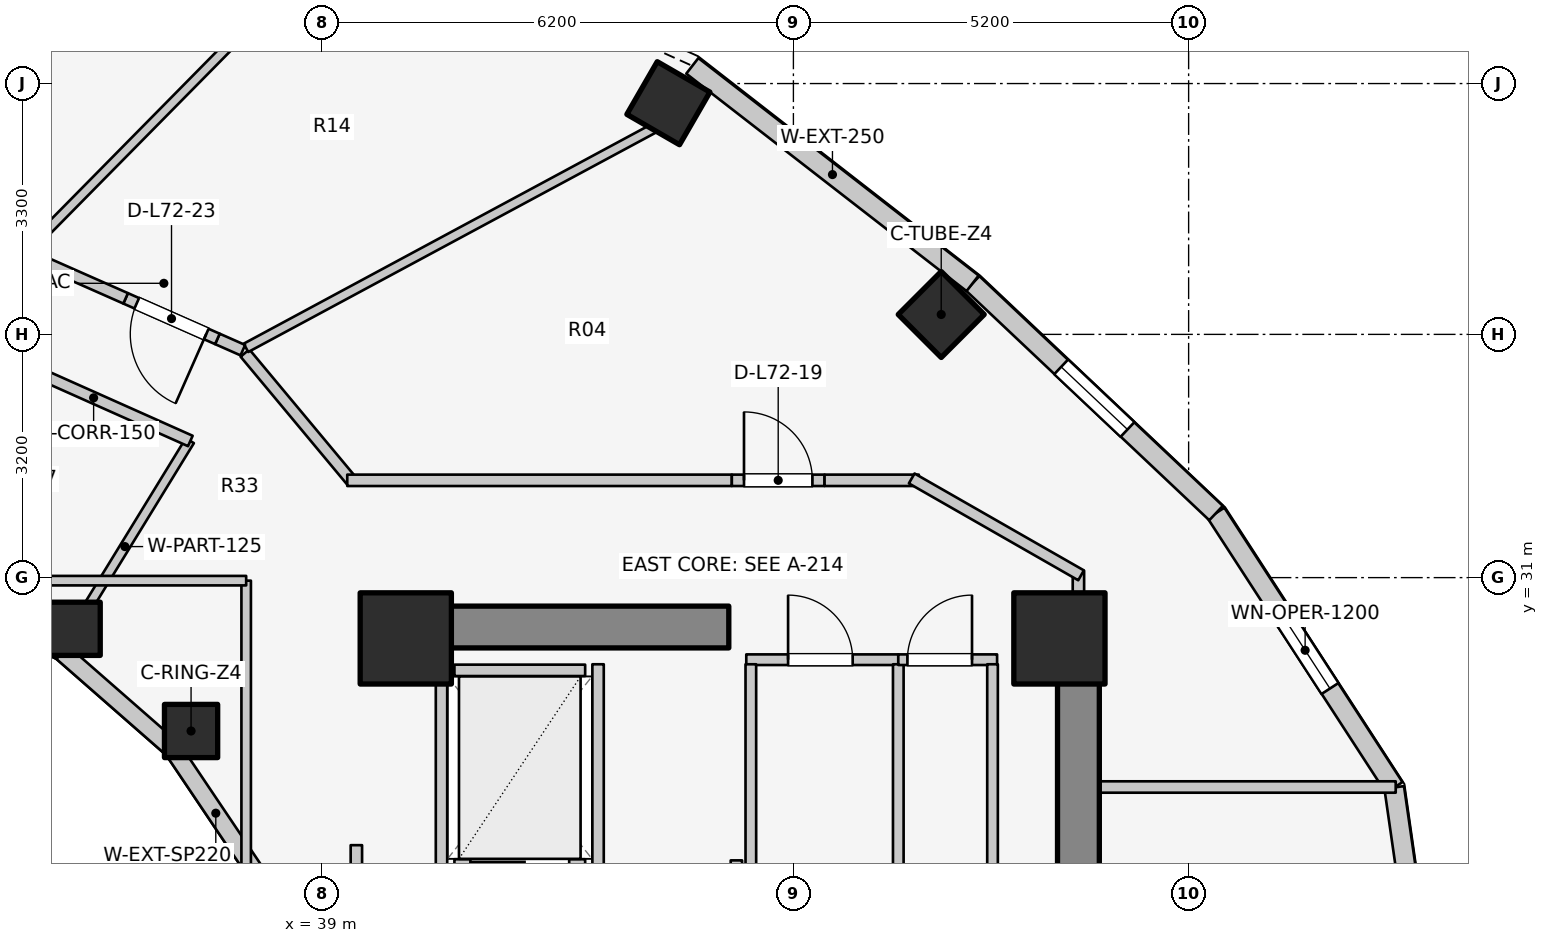
"""IFC4 building model, lengths in metres.
Left out: names, types, materials, properties, quantities, classifications, styles, units other than length and angle.
Written with IfcOpenShell. Run it as: python <this file> out.ifc"""

import sys

from ifc_helpers import new_model, si_unit, direction, frame, frame_2d, origin, origin_2d, place, context, subcontext, project, spatial, rectangle, extrude, element, fill, save


model = new_model("IFC4")
c1 = context("Model", 3, precision=1e-05, world=origin(), true_north=direction((0.0, 1.0)))
c2 = subcontext(c1, "Body", "Model", "MODEL_VIEW")
j1 = project(units=[si_unit("LENGTHUNIT", "METRE"), si_unit("PLANEANGLEUNIT", "RADIAN")], contexts=[c1])
p1 = place(None, origin())
s1 = spatial("IfcSite", under=j1, at=p1, CompositionType="ELEMENT")
p2 = place(p1, origin())
s2 = spatial("IfcBuilding", under=s1, at=p2, CompositionType="ELEMENT")
p3 = place(p2, frame((0.0, 0.0, 235.7)))
s3 = spatial("IfcBuildingStorey", under=s2, at=p3, CompositionType="ELEMENT", Elevation=235.7)
p4 = place(p3, frame((48.95, 17.05, 0.0), z_axis=(0.0, 0.0, 1.0), x_axis=(0.0, 1.0, 0.0)))
e1 = element("IfcWall", 1, at=p4, inside=s3, PredefinedType="SHEAR", context=c2, shape_type="SweptSolid", body=[
    extrude(rectangle(XDim=12.8, YDim=0.55, at=frame_2d((6.4, 0.0))), origin(), (0.0, 0.0, 1.0), 3.1),
])
p5 = place(p3, frame((39.85, 30.35, 0.0), z_axis=(0.0, 0.0, 1.0), x_axis=(1.0, 0.0, 0.0)))
e2 = element("IfcWall", 2, at=p5, inside=s3, PredefinedType="SHEAR", context=c2, shape_type="SweptSolid", body=[
    extrude(rectangle(XDim=4.5, YDim=0.55, at=frame_2d((2.25, 0.0))), origin(), (0.0, 0.0, 1.0), 3.1),
])
for number, where, z_axis, x_axis in (
    (3, (48.7, 30.2, 0.0), (0.0, 0.0, 1.0), (1.0, 0.0, 0.0)),
    (4, (40.1, 30.2, 0.0), (0.0, 0.0, 1.0), (1.0, 0.0, 0.0)),
):
    element("IfcColumn", number, at=place(p3, frame(where, z_axis=z_axis, x_axis=x_axis)), inside=s3, PredefinedType="COLUMN", context=c2, shape_type="SweptSolid", body=[
        extrude(rectangle(XDim=1.2, YDim=1.2, at=origin_2d()), origin(), (0.0, 0.0, 1.0), 3.1),
    ])
p6 = place(p3, frame((37.275, 28.982, 0.0), z_axis=(0.0, 0.0, 1.0), x_axis=(1.0, 0.0, 0.0)))
e5 = element("IfcColumn", 5, at=p6, inside=s3, PredefinedType="COLUMN", context=c2, shape_type="SweptSolid", body=[
    extrude(rectangle(XDim=0.7, YDim=0.7, at=origin_2d()), origin(), (0.0, 0.0, 1.0), 3.1),
])
p7 = place(p3, frame((47.145, 34.462, 0.0), z_axis=(0.0, 0.0, 1.0), x_axis=(0.707106781187, 0.707106781187, 0.0)))
e6 = element("IfcColumn", 6, at=p7, inside=s3, PredefinedType="COLUMN", context=c2, shape_type="SweptSolid", body=[
    extrude(rectangle(XDim=0.8, YDim=0.8, at=origin_2d()), origin(), (0.0, 0.0, 1.0), 3.1),
])
p8 = place(p3, frame((35.73, 30.327, 0.0), z_axis=(0.0, 0.0, 1.0), x_axis=(1.0, 0.0, 0.0)))
e7 = element("IfcColumn", 7, at=p8, inside=s3, PredefinedType="COLUMN", context=c2, shape_type="SweptSolid", body=[
    extrude(rectangle(XDim=0.7, YDim=0.7, at=origin_2d()), origin(), (0.0, 0.0, 1.0), 3.1),
])
p9 = place(p3, frame((43.555, 37.241, 0.0), z_axis=(0.0, 0.0, 1.0), x_axis=(0.5, 0.866025403784, 0.0)))
e8 = element("IfcColumn", 8, at=p9, inside=s3, PredefinedType="COLUMN", context=c2, shape_type="SweptSolid", body=[
    extrude(rectangle(XDim=0.8, YDim=0.8, at=origin_2d()), origin(), (0.0, 0.0, 1.0), 3.1),
])
p10 = place(p3, frame((38.166, 27.06, 0.0), z_axis=(0.0, 0.0, 1.0), x_axis=(-0.558197800898, 0.829707909492, 0.0)))
e9 = element("IfcWall", 9, at=p10, inside=s3, PredefinedType="STANDARD", context=c2, shape_type="SweptSolid", body=[
    extrude(rectangle(XDim=2.027, YDim=0.23, at=frame_2d((1.013, 0.0))), origin(), (0.0, 0.0, 1.0), 1.22),
])
p11 = place(p3, frame((37.035, 28.742, 0.0), z_axis=(0.0, 0.0, 1.0), x_axis=(-0.752576694707, 0.658504607869, 0.0)))
e10 = element("IfcWall", 10, at=p11, inside=s3, PredefinedType="STANDARD", context=c2, shape_type="SweptSolid", body=[
    extrude(rectangle(XDim=1.959, YDim=0.23, at=frame_2d((0.98, 0.0))), origin(), (0.0, 0.0, 1.0), 1.22),
])
p12 = place(p3, frame((35.56, 30.032, 0.0), z_axis=(0.0, 0.0, 1.0), x_axis=(-0.904179699603, 0.427152280606, 0.0)))
e11 = element("IfcWall", 11, at=p12, inside=s3, PredefinedType="STANDARD", context=c2, shape_type="SweptSolid", body=[
    extrude(rectangle(XDim=1.899, YDim=0.23, at=frame_2d((0.95, 0.0))), origin(), (0.0, 0.0, 1.0), 1.22),
])
p13 = place(p3, frame((53.86, 23.0, 0.0), z_axis=(0.0, 0.0, 1.0), x_axis=(-0.142712754019, 0.989764148593, 0.0)))
e12 = element("IfcWall", 12, at=p13, inside=s3, PredefinedType="STANDARD", context=c2, shape_type="SweptSolid", body=[
    extrude(rectangle(XDim=5.293, YDim=0.26, at=frame_2d((2.646, 0.0))), origin(), (0.0, 0.0, 1.0), 2.57),
])
p14 = place(p13, frame((1.896, 0.0, 0.75)))
e13 = element("IfcOpeningElement", 13, at=p14, cuts=e12, PredefinedType="OPENING", context=c2, shape_type="SweptSolid", body=[
    extrude(rectangle(XDim=1.5, YDim=1.6, at=frame_2d((0.75, 0.8))), frame((0.0, 0.14, 0.0), z_axis=(0.0, -1.0, 0.0), x_axis=(1.0, 0.0, 0.0)), (0.0, 0.0, 1.0), 0.28),
])
p15 = place(p3, frame((53.105, 28.239, 0.0), z_axis=(0.0, 0.0, 1.0), x_axis=(-0.544475908819, 0.838776480784, 0.0)))
e14 = element("IfcWall", 14, at=p15, inside=s3, PredefinedType="STANDARD", context=c2, shape_type="SweptSolid", body=[
    extrude(rectangle(XDim=4.305, YDim=0.26, at=frame_2d((2.152, 0.0))), origin(), (0.0, 0.0, 1.0), 1.22),
])
p16 = place(p15, frame((1.552, 0.0, 0.15)))
e15 = element("IfcOpeningElement", 15, at=p16, cuts=e14, PredefinedType="OPENING", context=c2, shape_type="SweptSolid", body=[
    extrude(rectangle(XDim=1.2, YDim=0.9, at=frame_2d((0.6, 0.45))), frame((0.0, 0.14, 0.0), z_axis=(0.0, -1.0, 0.0), x_axis=(1.0, 0.0, 0.0)), (0.0, 0.0, 1.0), 0.28),
])
p17 = place(p3, frame((50.761, 31.849, 0.0), z_axis=(0.0, 0.0, 1.0), x_axis=(-0.72731899451, 0.686299555752, 0.0)))
e16 = element("IfcWall", 16, at=p17, inside=s3, PredefinedType="STANDARD", context=c2, shape_type="SweptSolid", body=[
    extrude(rectangle(XDim=4.404, YDim=0.26, at=frame_2d((2.202, 0.0))), origin(), (0.0, 0.0, 1.0), 1.22),
])
p18 = place(p17, frame((1.602, 0.0, 0.15)))
e17 = element("IfcOpeningElement", 17, at=p18, cuts=e16, PredefinedType="OPENING", context=c2, shape_type="SweptSolid", body=[
    extrude(rectangle(XDim=1.2, YDim=0.9, at=frame_2d((0.6, 0.45))), frame((0.0, 0.14, 0.0), z_axis=(0.0, -1.0, 0.0), x_axis=(1.0, 0.0, 0.0)), (0.0, 0.0, 1.0), 0.28),
])
p19 = place(p3, frame((47.558, 34.872, 0.0), z_axis=(0.0, 0.0, 1.0), x_axis=(-0.790126214723, 0.612944177563, 0.0)))
e18 = element("IfcWall", 18, at=p19, inside=s3, PredefinedType="STANDARD", context=c2, shape_type="SweptSolid", body=[
    extrude(rectangle(XDim=4.667, YDim=0.26, at=frame_2d((2.333, 0.0))), origin(), (0.0, 0.0, 1.0), 1.22),
])
p20 = place(p3, frame((40.74, 27.22, 0.0), z_axis=(0.0, 0.0, 1.0), x_axis=(1.0, 0.0, 0.0)))
e19 = element("IfcWall", 19, at=p20, inside=s3, PredefinedType="SOLIDWALL", context=c2, shape_type="SweptSolid", body=[
    extrude(rectangle(XDim=1.72, YDim=0.15, at=frame_2d((0.86, 0.0))), origin(), (0.0, 0.0, 1.0), 2.575),
])
p21 = place(p20, frame((0.21, 0.0, 0.0)))
e20 = element("IfcOpeningElement", 20, at=p21, cuts=e19, PredefinedType="OPENING", context=c2, shape_type="SweptSolid", body=[
    extrude(rectangle(XDim=1.3, YDim=2.1, at=frame_2d((0.65, 1.05))), frame((0.0, 0.085, 0.0), z_axis=(0.0, -1.0, 0.0), x_axis=(1.0, 0.0, 0.0)), (0.0, 0.0, 1.0), 0.17),
])
p22 = place(p3, frame((40.74, 29.78, 0.0), z_axis=(0.0, 0.0, 1.0), x_axis=(1.0, 0.0, 0.0)))
e21 = element("IfcWall", 21, at=p22, inside=s3, PredefinedType="SOLIDWALL", context=c2, shape_type="SweptSolid", body=[
    extrude(rectangle(XDim=1.72, YDim=0.15, at=frame_2d((0.86, 0.0))), origin(), (0.0, 0.0, 1.0), 2.575),
])
for number, where, z_axis, x_axis in (
    (22, (40.57, 27.14, 0.0), (0.0, 0.0, 1.0), (0.0, 1.0, 0.0)),
    (23, (42.63, 27.14, 0.0), (0.0, 0.0, 1.0), (0.0, 1.0, 0.0)),
):
    element("IfcWall", number, at=place(p3, frame(where, z_axis=z_axis, x_axis=x_axis)), inside=s3, PredefinedType="SOLIDWALL", context=c2, shape_type="SweptSolid", body=[
        extrude(rectangle(XDim=2.72, YDim=0.15, at=frame_2d((1.36, 0.0))), origin(), (0.0, 0.0, 1.0), 2.575),
    ])
p23 = place(p3, frame((44.45, 24.08, 0.0), z_axis=(0.0, 0.0, 1.0), x_axis=(0.0, 1.0, 0.0)))
e24 = element("IfcWall", 24, at=p23, inside=s3, PredefinedType="PARTITIONING", context=c2, shape_type="SweptSolid", body=[
    extrude(rectangle(XDim=3.2, YDim=0.15, at=frame_2d((1.6, 0.0))), origin(), (0.0, 0.0, 1.0), 2.575),
])
p24 = place(p3, frame((39.45, 24.08, 0.0), z_axis=(0.0, 0.0, 1.0), x_axis=(0.0, 1.0, 0.0)))
e25 = element("IfcWall", 25, at=p24, inside=s3, PredefinedType="PARTITIONING", context=c2, shape_type="SweptSolid", body=[
    extrude(rectangle(XDim=3.4, YDim=0.15, at=frame_2d((1.7, 0.0))), origin(), (0.0, 0.0, 1.0), 2.575),
])
p25 = place(p24, frame((1.894, 0.0, 0.0)))
e26 = element("IfcOpeningElement", 26, at=p25, cuts=e25, PredefinedType="OPENING", context=c2, shape_type="SweptSolid", body=[
    extrude(rectangle(XDim=1.1, YDim=2.1, at=frame_2d((0.55, 1.05))), frame((0.0, 0.085, 0.0), z_axis=(0.0, -1.0, 0.0), x_axis=(1.0, 0.0, 0.0)), (0.0, 0.0, 1.0), 0.17),
])
p26 = place(p3, frame((44.58, 29.92, 0.0), z_axis=(0.0, 0.0, 1.0), x_axis=(1.0, 0.0, 0.0)))
e27 = element("IfcWall", 27, at=p26, inside=s3, PredefinedType="PLUMBINGWALL", context=c2, shape_type="SweptSolid", body=[
    extrude(rectangle(XDim=2.0, YDim=0.14, at=frame_2d((1.0, 0.0))), origin(), (0.0, 0.0, 1.0), 2.575),
])
p27 = place(p26, frame((0.55, 0.0, 0.0)))
e28 = element("IfcOpeningElement", 28, at=p27, cuts=e27, PredefinedType="OPENING", context=c2, shape_type="SweptSolid", body=[
    extrude(rectangle(XDim=0.85, YDim=2.05, at=frame_2d((0.425, 1.025))), frame((0.0, 0.08, 0.0), z_axis=(0.0, -1.0, 0.0), x_axis=(1.0, 0.0, 0.0)), (0.0, 0.0, 1.0), 0.16),
])
for number, where, z_axis, x_axis in (
    (29, (44.64, 25.98, 0.0), (0.0, 0.0, 1.0), (0.0, 1.0, 0.0)),
    (30, (46.58, 25.98, 0.0), (0.0, 0.0, 1.0), (0.0, 1.0, 0.0)),
):
    element("IfcWall", number, at=place(p3, frame(where, z_axis=z_axis, x_axis=x_axis)), inside=s3, PredefinedType="PLUMBINGWALL", context=c2, shape_type="SweptSolid", body=[
        extrude(rectangle(XDim=3.88, YDim=0.14, at=frame_2d((1.94, 0.0))), origin(), (0.0, 0.0, 1.0), 2.575),
    ])
p28 = place(p3, frame((46.58, 29.92, 0.0), z_axis=(0.0, 0.0, 1.0), x_axis=(1.0, 0.0, 0.0)))
e31 = element("IfcWall", 31, at=p28, inside=s3, PredefinedType="PLUMBINGWALL", context=c2, shape_type="SweptSolid", body=[
    extrude(rectangle(XDim=1.3, YDim=0.14, at=frame_2d((0.65, 0.0))), origin(), (0.0, 0.0, 1.0), 2.575),
])
p29 = place(p28, frame((0.12, 0.0, 0.0)))
e32 = element("IfcOpeningElement", 32, at=p29, cuts=e31, PredefinedType="OPENING", context=c2, shape_type="SweptSolid", body=[
    extrude(rectangle(XDim=0.85, YDim=2.05, at=frame_2d((0.425, 1.025))), frame((0.0, 0.08, 0.0), z_axis=(0.0, -1.0, 0.0), x_axis=(1.0, 0.0, 0.0)), (0.0, 0.0, 1.0), 0.16),
])
p30 = place(p3, frame((47.82, 25.98, 0.0), z_axis=(0.0, 0.0, 1.0), x_axis=(0.0, 1.0, 0.0)))
e33 = element("IfcWall", 33, at=p30, inside=s3, PredefinedType="PLUMBINGWALL", context=c2, shape_type="SweptSolid", body=[
    extrude(rectangle(XDim=3.88, YDim=0.14, at=frame_2d((1.94, 0.0))), origin(), (0.0, 0.0, 1.0), 2.575),
])
p31 = place(p3, frame((35.55, 30.015, 0.0), z_axis=(0.0, 0.0, 1.0), x_axis=(0.522763432117, 0.852477796802, 0.0)))
e34 = element("IfcWall", 34, at=p31, inside=s3, PredefinedType="PARTITIONING", context=c2, shape_type="SweptSolid", body=[
    extrude(rectangle(XDim=3.269, YDim=0.125, at=frame_2d((1.635, 0.0))), origin(), (0.0, 0.0, 1.0), 1.22),
])
p32 = place(p3, frame((37.265, 32.798, 0.0), z_axis=(0.0, 0.0, 1.0), x_axis=(-0.913254317828, 0.407389924971, 0.0)))
e35 = element("IfcWall", 35, at=p32, inside=s3, PredefinedType="PARTITIONING", context=c2, shape_type="SweptSolid", body=[
    extrude(rectangle(XDim=2.787, YDim=0.15, at=frame_2d((1.393, 0.0))), origin(), (0.0, 0.0, 1.0), 1.22),
])
p33 = place(p3, frame((38.0, 25.8, 0.0), z_axis=(0.0, 0.0, 1.0), x_axis=(0.0, 1.0, 0.0)))
e36 = element("IfcWall", 36, at=p33, inside=s3, PredefinedType="PARTITIONING", context=c2, shape_type="SweptSolid", body=[
    extrude(rectangle(XDim=5.16, YDim=0.125, at=frame_2d((2.58, 0.0))), origin(), (0.0, 0.0, 1.0), 1.952),
])
p34 = place(p3, frame((35.4, 30.96, 0.0), z_axis=(0.0, 0.0, 1.0), x_axis=(1.0, 0.0, 0.0)))
e37 = element("IfcWall", 37, at=p34, inside=s3, PredefinedType="PARTITIONING", context=c2, shape_type="SweptSolid", body=[
    extrude(rectangle(XDim=2.6, YDim=0.125, at=frame_2d((1.3, 0.0))), origin(), (0.0, 0.0, 1.0), 1.22),
])
p35 = place(p3, frame((48.95, 28.245, 0.0), z_axis=(0.0, 0.0, 1.0), x_axis=(1.0, 0.0, 0.0)))
e38 = element("IfcWall", 38, at=p35, inside=s3, PredefinedType="PARTITIONING", context=c2, shape_type="SweptSolid", body=[
    extrude(rectangle(XDim=4.175, YDim=0.15, at=frame_2d((2.087, 0.0))), origin(), (0.0, 0.0, 1.0), 2.575),
])
p36 = place(p3, frame((48.95, 29.8, 0.0), z_axis=(0.0, 0.0, 1.0), x_axis=(0.0, 1.0, 0.0)))
e39 = element("IfcWall", 39, at=p36, inside=s3, PredefinedType="PARTITIONING", context=c2, shape_type="SweptSolid", body=[
    extrude(rectangle(XDim=1.29, YDim=0.15, at=frame_2d((0.645, 0.0))), origin(), (0.0, 0.0, 1.0), 1.22),
])
p37 = place(p3, frame((37.984, 33.955, 0.0), z_axis=(0.0, 0.0, 1.0), x_axis=(0.64030392053, -0.76812166312, 0.0)))
e40 = element("IfcWall", 40, at=p37, inside=s3, PredefinedType="PARTITIONING", context=c2, shape_type="SweptSolid", body=[
    extrude(rectangle(XDim=2.21, YDim=0.15, at=frame_2d((1.105, 0.0))), origin(), (0.0, 0.0, 1.0), 1.22),
])
p38 = place(p3, frame((39.33, 32.28, 0.0), z_axis=(0.0, 0.0, 1.0), x_axis=(1.0, 0.0, 0.0)))
e41 = element("IfcWall", 41, at=p38, inside=s3, PredefinedType="PARTITIONING", context=c2, shape_type="SweptSolid", body=[
    extrude(rectangle(XDim=5.06, YDim=0.15, at=frame_2d((2.53, 0.0))), origin(), (0.0, 0.0, 1.0), 1.22),
])
p39 = place(p3, frame((44.39, 32.28, 0.0), z_axis=(0.0, 0.0, 1.0), x_axis=(1.0, 0.0, 0.0)))
e42 = element("IfcWall", 42, at=p39, inside=s3, PredefinedType="PARTITIONING", context=c2, shape_type="SweptSolid", body=[
    extrude(rectangle(XDim=1.22, YDim=0.15, at=frame_2d((0.61, 0.0))), origin(), (0.0, 0.0, 1.0), 2.16),
])
p40 = place(p39, frame((0.16, 0.0, 0.0)))
e43 = element("IfcOpeningElement", 43, at=p40, cuts=e42, PredefinedType="OPENING", context=c2, shape_type="SweptSolid", body=[
    extrude(rectangle(XDim=0.9, YDim=2.1, at=frame_2d((0.45, 1.05))), frame((0.0, 0.085, 0.0), z_axis=(0.0, -1.0, 0.0), x_axis=(1.0, 0.0, 0.0)), (0.0, 0.0, 1.0), 0.17),
])
p41 = place(p3, frame((45.61, 32.28, 0.0), z_axis=(0.0, 0.0, 1.0), x_axis=(1.0, 0.0, 0.0)))
e44 = element("IfcWall", 44, at=p41, inside=s3, PredefinedType="PARTITIONING", context=c2, shape_type="SweptSolid", body=[
    extrude(rectangle(XDim=1.24, YDim=0.15, at=frame_2d((0.62, 0.0))), origin(), (0.0, 0.0, 1.0), 2.575),
])
p42 = place(p3, frame((46.757, 32.305, 0.0), z_axis=(0.0, 0.0, 1.0), x_axis=(0.867991349648, -0.496579315857, 0.0)))
e45 = element("IfcWall", 45, at=p42, inside=s3, PredefinedType="PARTITIONING", context=c2, shape_type="SweptSolid", body=[
    extrude(rectangle(XDim=2.567, YDim=0.15, at=frame_2d((1.283, 0.0))), origin(), (0.0, 0.0, 1.0), 1.22),
])
p43 = place(p3, frame((37.997, 34.023, 0.0), z_axis=(0.0, 0.0, 1.0), x_axis=(0.880531534665, 0.473987569943, 0.0)))
e46 = element("IfcWall", 46, at=p43, inside=s3, PredefinedType="PARTITIONING", context=c2, shape_type="SweptSolid", body=[
    extrude(rectangle(XDim=6.096, YDim=0.125, at=frame_2d((3.048, 0.0))), origin(), (0.0, 0.0, 1.0), 1.22),
])
p44 = place(p3, frame((35.118, 35.304, 0.0), z_axis=(0.0, 0.0, 1.0), x_axis=(0.702191571271, 0.711988059756, 0.0)))
e47 = element("IfcWall", 47, at=p44, inside=s3, PredefinedType="PARTITIONING", context=c2, shape_type="SweptSolid", body=[
    extrude(rectangle(XDim=5.184, YDim=0.125, at=frame_2d((2.592, 0.0))), origin(), (0.0, 0.0, 1.0), 1.22),
])
p45 = place(p3, frame((37.956, 33.992, 0.0), z_axis=(0.0, 0.0, 1.0), x_axis=(-0.91474391497, 0.404034119877, 0.0)))
e48 = element("IfcWall", 48, at=p45, inside=s3, PredefinedType="PARTITIONING", context=c2, shape_type="SweptSolid", body=[
    extrude(rectangle(XDim=0.366, YDim=0.15, at=frame_2d((0.183, 0.0))), origin(), (0.0, 0.0, 1.0), 2.575),
])
p46 = place(p3, frame((37.621, 34.14, 0.0), z_axis=(0.0, 0.0, 1.0), x_axis=(-0.914618215061, 0.404318588094, 0.0)))
e49 = element("IfcWall", 49, at=p46, inside=s3, PredefinedType="PARTITIONING", context=c2, shape_type="SweptSolid", body=[
    extrude(rectangle(XDim=1.32, YDim=0.15, at=frame_2d((0.66, 0.0))), origin(), (0.0, 0.0, 1.0), 2.16),
])
p47 = place(p46, frame((0.16, 0.0, 0.0)))
e50 = element("IfcOpeningElement", 50, at=p47, cuts=e49, PredefinedType="OPENING", context=c2, shape_type="SweptSolid", body=[
    extrude(rectangle(XDim=1.0, YDim=2.1, at=frame_2d((0.5, 1.05))), frame((0.0, 0.085, 0.0), z_axis=(0.0, -1.0, 0.0), x_axis=(1.0, 0.0, 0.0)), (0.0, 0.0, 1.0), 0.17),
])
p48 = place(p3, frame((36.414, 34.674, 0.0), z_axis=(0.0, 0.0, 1.0), x_axis=(-0.914639417368, 0.404270622476, 0.0)))
e51 = element("IfcWall", 51, at=p48, inside=s3, PredefinedType="PARTITIONING", context=c2, shape_type="SweptSolid", body=[
    extrude(rectangle(XDim=1.468, YDim=0.15, at=frame_2d((0.734, 0.0))), origin(), (0.0, 0.0, 1.0), 1.22),
])
p49 = place(p16, origin())
e52 = element("IfcWindow", 52, at=p49, inside=s3, PartitioningType="SINGLE_PANEL", PredefinedType="WINDOW", context=c2, shape_type="SweptSolid", body=[
    extrude(rectangle(XDim=1.2, YDim=0.9, at=frame_2d((0.6, 0.45))), frame((0.0, 0.03, 0.0), z_axis=(0.0, -1.0, 0.0), x_axis=(1.0, 0.0, 0.0)), (0.0, 0.0, 1.0), 0.06),
])
fill(e15, e52)
p50 = place(p18, origin())
e53 = element("IfcWindow", 53, at=p50, inside=s3, PartitioningType="SINGLE_PANEL", PredefinedType="WINDOW", context=c2, shape_type="SweptSolid", body=[
    extrude(rectangle(XDim=1.2, YDim=0.9, at=frame_2d((0.6, 0.45))), frame((0.0, 0.03, 0.0), z_axis=(0.0, -1.0, 0.0), x_axis=(1.0, 0.0, 0.0)), (0.0, 0.0, 1.0), 0.06),
])
fill(e17, e53)
p51 = place(p27, origin())
e54 = element("IfcDoor", 54, at=p51, inside=s3, OperationType="SINGLE_SWING_LEFT", PredefinedType="DOOR", context=c2, shape_type="SweptSolid", body=[
    extrude(rectangle(XDim=0.85, YDim=2.05, at=frame_2d((0.425, 1.025))), frame((0.0, 0.025, 0.0), z_axis=(0.0, -1.0, 0.0), x_axis=(1.0, 0.0, 0.0)), (0.0, 0.0, 1.0), 0.05),
])
fill(e28, e54)
p52 = place(p29, origin())
e55 = element("IfcDoor", 55, at=p52, inside=s3, OperationType="SINGLE_SWING_RIGHT", PredefinedType="DOOR", context=c2, shape_type="SweptSolid", body=[
    extrude(rectangle(XDim=0.85, YDim=2.05, at=frame_2d((0.425, 1.025))), frame((0.0, 0.025, 0.0), z_axis=(0.0, -1.0, 0.0), x_axis=(1.0, 0.0, 0.0)), (0.0, 0.0, 1.0), 0.05),
])
fill(e32, e55)
p53 = place(p40, origin())
e56 = element("IfcDoor", 56, at=p53, inside=s3, OperationType="SINGLE_SWING_LEFT", PredefinedType="DOOR", context=c2, shape_type="SweptSolid", body=[
    extrude(rectangle(XDim=0.9, YDim=2.1, at=frame_2d((0.45, 1.05))), frame((0.0, 0.025, 0.0), z_axis=(0.0, -1.0, 0.0), x_axis=(1.0, 0.0, 0.0)), (0.0, 0.0, 1.0), 0.05),
])
fill(e43, e56)
p54 = place(p47, origin())
e57 = element("IfcDoor", 57, at=p54, inside=s3, OperationType="SINGLE_SWING_LEFT", PredefinedType="DOOR", context=c2, shape_type="SweptSolid", body=[
    extrude(rectangle(XDim=1.0, YDim=2.1, at=frame_2d((0.5, 1.05))), frame((0.0, 0.025, 0.0), z_axis=(0.0, -1.0, 0.0), x_axis=(1.0, 0.0, 0.0)), (0.0, 0.0, 1.0), 0.05),
])
fill(e50, e57)
save(model, sys.argv[1])
